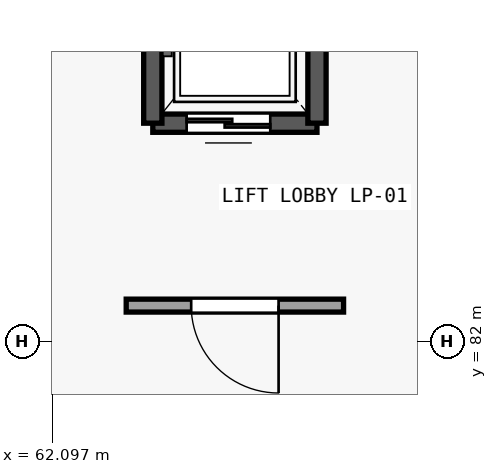
"""IFC4 building model, lengths in metres.
Left out: names, types, materials, properties, quantities, classifications, styles, units other than length and angle.
Written with IfcOpenShell. Run it as: python <this file> out.ifc"""

import sys

from ifc_helpers import new_model, si_unit, direction, frame, frame_2d, origin, place, context, subcontext, project, spatial, rectangle, extrude, element, fill, save


model = new_model("IFC4")
c1 = context("Model", 3, precision=1e-05, world=origin(), true_north=direction((0.0, 1.0)))
c2 = subcontext(c1, "Body", "Model", "MODEL_VIEW")
j1 = project(units=[si_unit("LENGTHUNIT", "METRE"), si_unit("PLANEANGLEUNIT", "RADIAN")], contexts=[c1])
p1 = place(None, origin())
s1 = spatial("IfcSite", under=j1, at=p1, CompositionType="ELEMENT")
p2 = place(p1, origin())
s2 = spatial("IfcBuilding", under=s1, at=p2, CompositionType="ELEMENT")
p3 = place(p2, origin())
s3 = spatial("IfcBuildingStorey", under=s2, at=p3, CompositionType="ELEMENT", Elevation=0.0)
p4 = place(p3, frame((65.58, 84.87, 0.0), z_axis=(0.0, 0.0, 1.0), x_axis=(-1.0, 0.0, 0.0)))
e1 = element("IfcWall", 1, at=p4, inside=s3, PredefinedType="SOLIDWALL", context=c2, shape_type="SweptSolid", body=[
    extrude(rectangle(XDim=2.16, YDim=0.24, at=frame_2d((1.08, 0.0))), origin(), (0.0, 0.0, 1.0), 5.08),
])
p5 = place(p4, frame((0.615, 0.0, 0.0)))
e2 = element("IfcOpeningElement", 2, at=p5, cuts=e1, PredefinedType="OPENING", context=c2, shape_type="SweptSolid", body=[
    extrude(rectangle(XDim=1.1, YDim=2.15, at=frame_2d((0.55, 1.075))), frame((0.0, 0.13, 0.0), z_axis=(0.0, -1.0, 0.0), x_axis=(1.0, 0.0, 0.0)), (0.0, 0.0, 1.0), 0.26),
])
for number, where, z_axis, x_axis in (
    (3, (63.42, 84.87, 0.0), (0.0, 0.0, 1.0), (0.0, 1.0, 0.0)),
    (4, (65.58, 87.53, 0.0), (0.0, 0.0, 1.0), (0.0, -1.0, 0.0)),
):
    element("IfcWall", number, at=place(p3, frame(where, z_axis=z_axis, x_axis=x_axis)), inside=s3, PredefinedType="SOLIDWALL", context=c2, shape_type="SweptSolid", body=[
        extrude(rectangle(XDim=2.66, YDim=0.24, at=frame_2d((1.33, 0.0))), origin(), (0.0, 0.0, 1.0), 5.08),
    ])
p6 = place(p3, frame((65.93, 82.47, 0.0), z_axis=(0.0, 0.0, 1.0), x_axis=(-1.0, 0.0, 0.0)))
e5 = element("IfcWall", 5, at=p6, inside=s3, PredefinedType="PARTITIONING", context=c2, shape_type="SweptSolid", body=[
    extrude(rectangle(XDim=2.86, YDim=0.17, at=frame_2d((1.43, 0.0))), origin(), (0.0, 0.0, 1.0), 5.08),
])
p7 = place(p6, frame((0.855, 0.0, 0.0)))
e6 = element("IfcOpeningElement", 6, at=p7, cuts=e5, PredefinedType="OPENING", context=c2, shape_type="SweptSolid", body=[
    extrude(rectangle(XDim=1.15, YDim=2.15, at=frame_2d((0.575, 1.075))), frame((0.0, 0.095, 0.0), z_axis=(0.0, -1.0, 0.0), x_axis=(1.0, 0.0, 0.0)), (0.0, 0.0, 1.0), 0.19),
])
p8 = place(p5, origin())
e7 = element("IfcDoor", 7, at=p8, inside=s3, OperationType="DOUBLE_DOOR_SLIDING", PredefinedType="DOOR", context=c2, shape_type="SweptSolid", body=[
    extrude(rectangle(XDim=1.1, YDim=2.15, at=frame_2d((0.55, 1.075))), frame((0.0, 0.025, 0.0), z_axis=(0.0, -1.0, 0.0), x_axis=(1.0, 0.0, 0.0)), (0.0, 0.0, 1.0), 0.05),
])
fill(e2, e7)
p9 = place(p7, origin())
e8 = element("IfcDoor", 8, at=p9, inside=s3, OperationType="SINGLE_SWING_LEFT", PredefinedType="DOOR", context=c2, shape_type="SweptSolid", body=[
    extrude(rectangle(XDim=1.15, YDim=2.15, at=frame_2d((0.575, 1.075))), frame((0.0, 0.025, 0.0), z_axis=(0.0, -1.0, 0.0), x_axis=(1.0, 0.0, 0.0)), (0.0, 0.0, 1.0), 0.05),
])
fill(e6, e8)
save(model, sys.argv[1])
